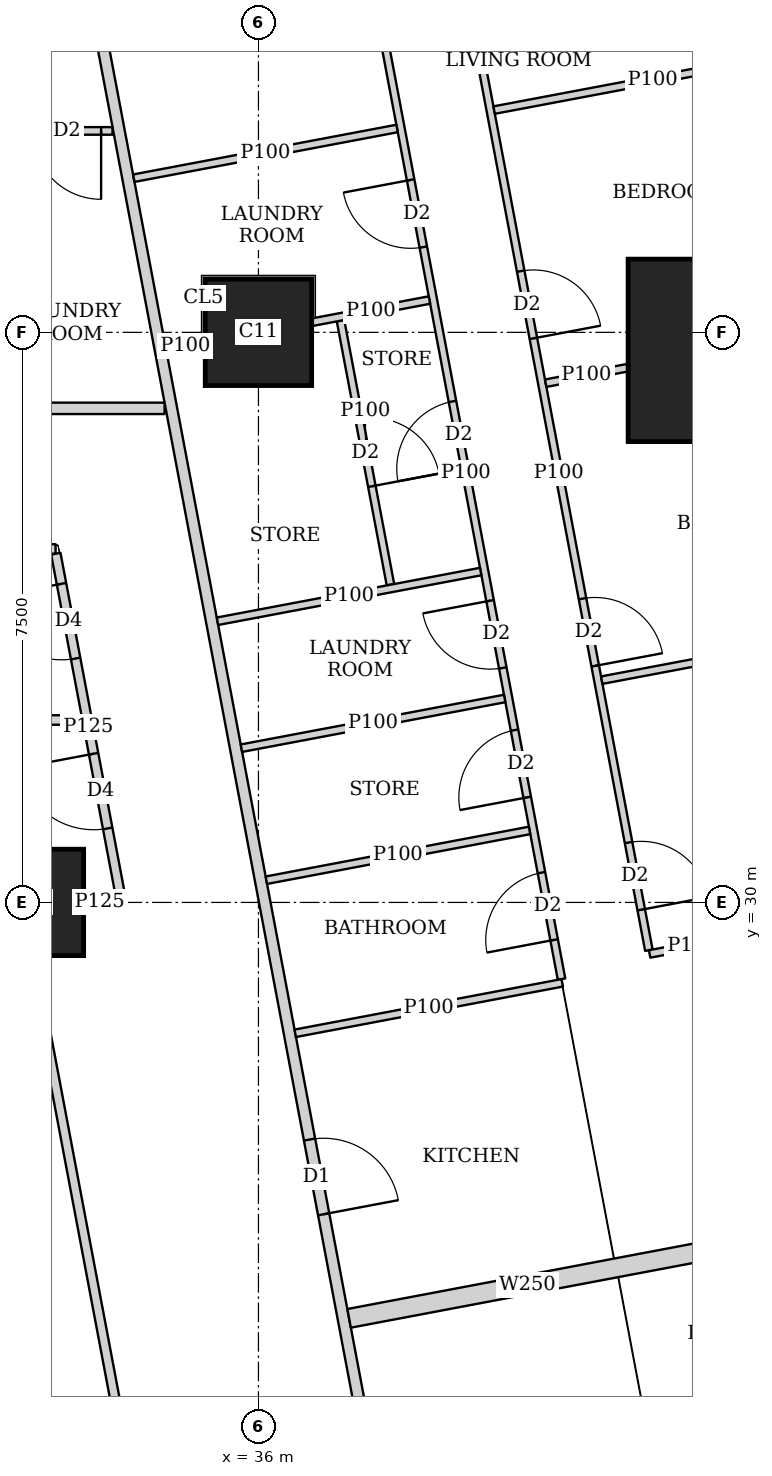
"""IFC4 building model, lengths in metres.
Left out: names, types, materials, properties, quantities, classifications, styles, units other than length and angle.
Written with IfcOpenShell. Run it as: python <this file> out.ifc"""

import sys

from ifc_helpers import new_model, si_unit, direction, frame, frame_2d, origin, origin_2d, place, context, subcontext, project, spatial, rectangle, extrude, element, fill, save


model = new_model("IFC4")
c1 = context("Model", 3, precision=1e-05, world=origin(), true_north=direction((0.0, 1.0)))
c2 = subcontext(c1, "Body", "Model", "MODEL_VIEW")
j1 = project(units=[si_unit("LENGTHUNIT", "METRE"), si_unit("PLANEANGLEUNIT", "RADIAN")], contexts=[c1])
p1 = place(None, origin())
s1 = spatial("IfcSite", under=j1, at=p1, CompositionType="ELEMENT")
p2 = place(p1, origin())
s2 = spatial("IfcBuilding", under=s1, at=p2, CompositionType="ELEMENT")
p3 = place(p2, frame((0.0, 0.0, 227.45)))
s3 = spatial("IfcBuildingStorey", under=s2, at=p3, CompositionType="ELEMENT", Elevation=227.45)
for number, where, z_axis, x_axis in (
    (1, (33.0, 30.0, 0.0), (0.0, 0.0, 1.0), (1.0, 0.0, 0.0)),
    (2, (36.0, 37.5, 0.0), (0.0, 0.0, 1.0), (1.0, 0.0, 0.0)),
):
    element("IfcColumn", number, at=place(p3, frame(where, z_axis=z_axis, x_axis=x_axis)), inside=s3, PredefinedType="COLUMN", context=c2, shape_type="SweptSolid", body=[
        extrude(rectangle(XDim=1.4, YDim=1.4, at=origin_2d()), origin(), (0.0, 0.0, 1.0), 3.75),
    ])
p4 = place(p3, frame((42.064, 37.263, 0.0), z_axis=(0.0, 0.0, 1.0), x_axis=(1.0, 0.0, 0.0)))
e3 = element("IfcColumn", 3, at=p4, inside=s3, PredefinedType="COLUMN", context=c2, shape_type="SweptSolid", body=[
    extrude(rectangle(XDim=2.4, YDim=2.4, at=origin_2d()), origin(), (0.0, 0.0, 1.0), 3.75),
])
p5 = place(p3, frame((16.201, 36.5, 0.0), z_axis=(0.0, 0.0, 1.0), x_axis=(1.0, 0.0, 0.0)))
e4 = element("IfcWall", 4, at=p5, inside=s3, PredefinedType="SOLIDWALL", context=c2, shape_type="SweptSolid", body=[
    extrude(rectangle(XDim=18.564, YDim=0.15, at=frame_2d((9.282, 0.0))), origin(), (0.0, 0.0, 1.0), 3.5),
])
p6 = place(p5, frame((0.874, 0.0, 0.0)))
e5 = element("IfcOpeningElement", 5, at=p6, cuts=e4, PredefinedType="OPENING", context=c2, shape_type="SweptSolid", body=[
    extrude(rectangle(XDim=1.0, YDim=2.1, at=frame_2d((0.5, 1.05))), frame((0.0, 0.085, 0.0), z_axis=(0.0, -1.0, 0.0), x_axis=(1.0, 0.0, 0.0)), (0.0, 0.0, 1.0), 0.17),
])
p7 = place(p5, frame((10.156, 0.0, 0.0)))
e6 = element("IfcOpeningElement", 6, at=p7, cuts=e4, PredefinedType="OPENING", context=c2, shape_type="SweptSolid", body=[
    extrude(rectangle(XDim=1.0, YDim=2.1, at=frame_2d((0.5, 1.05))), frame((0.0, 0.085, 0.0), z_axis=(0.0, -1.0, 0.0), x_axis=(1.0, 0.0, 0.0)), (0.0, 0.0, 1.0), 0.17),
])
p8 = place(p3, frame((33.68, 42.723, 0.0), z_axis=(0.0, 0.0, 1.0), x_axis=(0.185601160014, -0.982625162207, 0.0)))
e7 = element("IfcWall", 7, at=p8, inside=s3, PredefinedType="SOLIDWALL", context=c2, shape_type="SweptSolid", body=[
    extrude(rectangle(XDim=41.051, YDim=0.15, at=frame_2d((20.526, 0.0))), origin(), (0.0, 0.0, 1.0), 2.5),
])
p9 = place(p8, frame((16.123, 0.0, 0.0)))
e8 = element("IfcOpeningElement", 8, at=p9, cuts=e7, PredefinedType="OPENING", context=c2, shape_type="SweptSolid", body=[
    extrude(rectangle(XDim=1.0, YDim=2.1, at=frame_2d((0.5, 1.05))), frame((0.0, 0.085, 0.0), z_axis=(0.0, -1.0, 0.0), x_axis=(1.0, 0.0, 0.0)), (0.0, 0.0, 1.0), 0.17),
])
p10 = place(p8, frame((19.938, 0.0, 0.0)))
e9 = element("IfcOpeningElement", 9, at=p10, cuts=e7, PredefinedType="OPENING", context=c2, shape_type="SweptSolid", body=[
    extrude(rectangle(XDim=1.0, YDim=2.1, at=frame_2d((0.5, 1.05))), frame((0.0, 0.085, 0.0), z_axis=(0.0, -1.0, 0.0), x_axis=(1.0, 0.0, 0.0)), (0.0, 0.0, 1.0), 0.17),
])
p11 = place(p8, frame((30.902, 0.0, 0.0)))
e10 = element("IfcOpeningElement", 10, at=p11, cuts=e7, PredefinedType="OPENING", context=c2, shape_type="SweptSolid", body=[
    extrude(rectangle(XDim=1.0, YDim=2.1, at=frame_2d((0.5, 1.05))), frame((0.0, 0.085, 0.0), z_axis=(0.0, -1.0, 0.0), x_axis=(1.0, 0.0, 0.0)), (0.0, 0.0, 1.0), 0.17),
])
p12 = place(p3, frame((38.764, 41.941, 0.0), z_axis=(0.0, 0.0, 1.0), x_axis=(0.185512176227, -0.982641965556, 0.0)))
e11 = element("IfcWall", 11, at=p12, inside=s3, PredefinedType="PARTITIONING", context=c2, shape_type="SweptSolid", body=[
    extrude(rectangle(XDim=12.792, YDim=0.1, at=frame_2d((6.396, 0.0))), origin(), (0.0, 0.0, 1.0), 2.5),
])
p13 = place(p12, frame((11.35, 0.0, 0.0)))
e12 = element("IfcOpeningElement", 12, at=p13, cuts=e11, PredefinedType="OPENING", context=c2, shape_type="SweptSolid", body=[
    extrude(rectangle(XDim=0.9, YDim=2.1, at=frame_2d((0.45, 1.05))), frame((0.0, 0.06, 0.0), z_axis=(0.0, -1.0, 0.0), x_axis=(1.0, 0.0, 0.0)), (0.0, 0.0, 1.0), 0.12),
])
p14 = place(p12, frame((8.085, 0.0, 0.0)))
e13 = element("IfcOpeningElement", 13, at=p14, cuts=e11, PredefinedType="OPENING", context=c2, shape_type="SweptSolid", body=[
    extrude(rectangle(XDim=0.9, YDim=2.1, at=frame_2d((0.45, 1.05))), frame((0.0, 0.06, 0.0), z_axis=(0.0, -1.0, 0.0), x_axis=(1.0, 0.0, 0.0)), (0.0, 0.0, 1.0), 0.12),
])
p15 = place(p12, frame((3.7, 0.0, 0.0)))
e14 = element("IfcOpeningElement", 14, at=p15, cuts=e11, PredefinedType="OPENING", context=c2, shape_type="SweptSolid", body=[
    extrude(rectangle(XDim=0.9, YDim=2.1, at=frame_2d((0.45, 1.05))), frame((0.0, 0.06, 0.0), z_axis=(0.0, -1.0, 0.0), x_axis=(1.0, 0.0, 0.0)), (0.0, 0.0, 1.0), 0.12),
])
p16 = place(p3, frame((37.473, 42.309, 0.0), z_axis=(0.0, 0.0, 1.0), x_axis=(0.185570636839, -0.982630927024, 0.0)))
e15 = element("IfcWall", 15, at=p16, inside=s3, PredefinedType="PARTITIONING", context=c2, shape_type="SweptSolid", body=[
    extrude(rectangle(XDim=13.553, YDim=0.1, at=frame_2d((6.777, 0.0))), origin(), (0.0, 0.0, 1.0), 2.5),
])
p17 = place(p16, frame((12.128, 0.0, 0.0)))
e16 = element("IfcOpeningElement", 16, at=p17, cuts=e15, PredefinedType="OPENING", context=c2, shape_type="SweptSolid", body=[
    extrude(rectangle(XDim=0.9, YDim=2.1, at=frame_2d((0.45, 1.05))), frame((0.0, 0.06, 0.0), z_axis=(0.0, -1.0, 0.0), x_axis=(1.0, 0.0, 0.0)), (0.0, 0.0, 1.0), 0.12),
])
p18 = place(p16, frame((8.487, 0.0, 0.0)))
e17 = element("IfcOpeningElement", 17, at=p18, cuts=e15, PredefinedType="OPENING", context=c2, shape_type="SweptSolid", body=[
    extrude(rectangle(XDim=0.9, YDim=2.1, at=frame_2d((0.45, 1.05))), frame((0.0, 0.06, 0.0), z_axis=(0.0, -1.0, 0.0), x_axis=(1.0, 0.0, 0.0)), (0.0, 0.0, 1.0), 0.12),
])
p19 = place(p16, frame((2.853, 0.0, 0.0)))
e18 = element("IfcOpeningElement", 18, at=p19, cuts=e15, PredefinedType="OPENING", context=c2, shape_type="SweptSolid", body=[
    extrude(rectangle(XDim=0.9, YDim=2.1, at=frame_2d((0.45, 1.05))), frame((0.0, 0.06, 0.0), z_axis=(0.0, -1.0, 0.0), x_axis=(1.0, 0.0, 0.0)), (0.0, 0.0, 1.0), 0.12),
])
p20 = place(p16, frame((10.22, 0.0, 0.0)))
e19 = element("IfcOpeningElement", 19, at=p20, cuts=e15, PredefinedType="OPENING", context=c2, shape_type="SweptSolid", body=[
    extrude(rectangle(XDim=0.9, YDim=2.1, at=frame_2d((0.45, 1.05))), frame((0.0, 0.06, 0.0), z_axis=(0.0, -1.0, 0.0), x_axis=(1.0, 0.0, 0.0)), (0.0, 0.0, 1.0), 0.12),
])
p21 = place(p16, frame((5.819, 0.0, 0.0)))
e20 = element("IfcOpeningElement", 20, at=p21, cuts=e15, PredefinedType="OPENING", context=c2, shape_type="SweptSolid", body=[
    extrude(rectangle(XDim=0.9, YDim=2.1, at=frame_2d((0.45, 1.05))), frame((0.0, 0.06, 0.0), z_axis=(0.0, -1.0, 0.0), x_axis=(1.0, 0.0, 0.0)), (0.0, 0.0, 1.0), 0.12),
])
p22 = place(p3, frame((43.277, 41.212, 0.0), z_axis=(0.0, 0.0, 1.0), x_axis=(-0.982665405803, -0.185387972203, 0.0)))
e21 = element("IfcWall", 21, at=p22, inside=s3, PredefinedType="PARTITIONING", context=c2, shape_type="SweptSolid", body=[
    extrude(rectangle(XDim=4.25, YDim=0.1, at=frame_2d((2.125, 0.0))), origin(), (0.0, 0.0, 1.0), 2.05),
])
p23 = place(p3, frame((40.854, 37.034, 0.0), z_axis=(0.0, 0.0, 1.0), x_axis=(-0.982651678759, -0.185460718839, 0.0)))
e22 = element("IfcWall", 22, at=p23, inside=s3, PredefinedType="PARTITIONING", context=c2, shape_type="SweptSolid", body=[
    extrude(rectangle(XDim=1.094, YDim=0.1, at=frame_2d((0.547, 0.0))), origin(), (0.0, 0.0, 1.0), 3.5),
])
p24 = place(p3, frame((44.693, 33.713, 0.0), z_axis=(0.0, 0.0, 1.0), x_axis=(-0.982623519589, -0.185609856287, 0.0)))
e23 = element("IfcWall", 23, at=p24, inside=s3, PredefinedType="PARTITIONING", context=c2, shape_type="SweptSolid", body=[
    extrude(rectangle(XDim=4.25, YDim=0.1, at=frame_2d((2.125, 0.0))), origin(), (0.0, 0.0, 1.0), 2.05),
])
p25 = place(p3, frame((42.27, 29.535, 0.0), z_axis=(0.0, 0.0, 1.0), x_axis=(-0.982502700549, -0.186248338017, 0.0)))
e24 = element("IfcWall", 24, at=p25, inside=s3, PredefinedType="PARTITIONING", context=c2, shape_type="SweptSolid", body=[
    extrude(rectangle(XDim=1.143, YDim=0.1, at=frame_2d((0.572, 0.0))), origin(), (0.0, 0.0, 1.0), 2.5),
])
p26 = place(p3, frame((37.824, 40.182, 0.0), z_axis=(0.0, 0.0, 1.0), x_axis=(-0.982648794755, -0.185475998897, 0.0)))
e25 = element("IfcWall", 25, at=p26, inside=s3, PredefinedType="PARTITIONING", context=c2, shape_type="SweptSolid", body=[
    extrude(rectangle(XDim=3.525, YDim=0.1, at=frame_2d((1.763, 0.0))), origin(), (0.0, 0.0, 1.0), 3.5),
])
p27 = place(p3, frame((38.25, 37.925, 0.0), z_axis=(0.0, 0.0, 1.0), x_axis=(-0.982610209589, -0.185680305934, 0.0)))
e26 = element("IfcWall", 26, at=p27, inside=s3, PredefinedType="PARTITIONING", context=c2, shape_type="SweptSolid", body=[
    extrude(rectangle(XDim=1.567, YDim=0.1, at=frame_2d((0.784, 0.0))), origin(), (0.0, 0.0, 1.0), 3.5),
])
p28 = place(p3, frame((35.29, 37.366, 0.0), z_axis=(0.0, 0.0, 1.0), x_axis=(-0.982715597703, -0.185121727606, 0.0)))
e27 = element("IfcWall", 27, at=p28, inside=s3, PredefinedType="PARTITIONING", context=c2, shape_type="SweptSolid", body=[
    extrude(rectangle(XDim=0.513, YDim=0.1, at=frame_2d((0.256, 0.0))), origin(), (0.0, 0.0, 1.0), 3.5),
])
p29 = place(p3, frame((39.24, 32.683, 0.0), z_axis=(0.0, 0.0, 1.0), x_axis=(-0.982638553676, -0.185530247748, 0.0)))
e28 = element("IfcWall", 28, at=p29, inside=s3, PredefinedType="PARTITIONING", context=c2, shape_type="SweptSolid", body=[
    extrude(rectangle(XDim=3.525, YDim=0.1, at=frame_2d((1.763, 0.0))), origin(), (0.0, 0.0, 1.0), 3.5),
])
p30 = place(p3, frame((39.997, 28.942, 0.0), z_axis=(0.0, 0.0, 1.0), x_axis=(-0.982613029841, -0.185665380691, 0.0)))
e29 = element("IfcWall", 29, at=p30, inside=s3, PredefinedType="PARTITIONING", context=c2, shape_type="SweptSolid", body=[
    extrude(rectangle(XDim=3.575, YDim=0.1, at=frame_2d((1.788, 0.0))), origin(), (0.0, 0.0, 1.0), 3.5),
])
p31 = place(p3, frame((39.567, 30.947, 0.0), z_axis=(0.0, 0.0, 1.0), x_axis=(-0.982576058723, -0.185860939478, 0.0)))
e30 = element("IfcWall", 30, at=p31, inside=s3, PredefinedType="PARTITIONING", context=c2, shape_type="SweptSolid", body=[
    extrude(rectangle(XDim=3.524, YDim=0.1, at=frame_2d((1.762, 0.0))), origin(), (0.0, 0.0, 1.0), 2.5),
])
p32 = place(p3, frame((38.924, 34.353, 0.0), z_axis=(0.0, 0.0, 1.0), x_axis=(-0.982629014545, -0.18558076348, 0.0)))
e31 = element("IfcWall", 31, at=p32, inside=s3, PredefinedType="PARTITIONING", context=c2, shape_type="SweptSolid", body=[
    extrude(rectangle(XDim=3.524, YDim=0.1, at=frame_2d((1.762, 0.0))), origin(), (0.0, 0.0, 1.0), 3.5),
])
p33 = place(p3, frame((41.885, 25.415, 0.0), z_axis=(0.0, 0.0, 1.0), x_axis=(-0.982596737686, -0.185751584349, 0.0)))
e32 = element("IfcWall", 32, at=p33, inside=s3, PredefinedType="SOLIDWALL", context=c2, shape_type="SweptSolid", body=[
    extrude(rectangle(XDim=4.775, YDim=0.25, at=frame_2d((2.387, 0.0))), origin(), (0.0, 0.0, 1.0), 3.5),
])
p34 = place(p3, frame((28.8, 40.15, 0.0), z_axis=(0.0, 0.0, 1.0), x_axis=(1.0, 0.0, 0.0)))
e33 = element("IfcWall", 33, at=p34, inside=s3, PredefinedType="PARTITIONING", context=c2, shape_type="SweptSolid", body=[
    extrude(rectangle(XDim=5.28, YDim=0.1, at=frame_2d((2.64, 0.0))), origin(), (0.0, 0.0, 1.0), 3.5),
])
p35 = place(p34, frame((0.575, 0.0, 0.0)))
e34 = element("IfcOpeningElement", 34, at=p35, cuts=e33, PredefinedType="OPENING", context=c2, shape_type="SweptSolid", body=[
    extrude(rectangle(XDim=0.9, YDim=2.1, at=frame_2d((0.45, 1.05))), frame((0.0, 0.06, 0.0), z_axis=(0.0, -1.0, 0.0), x_axis=(1.0, 0.0, 0.0)), (0.0, 0.0, 1.0), 0.12),
])
p36 = place(p34, frame((4.23, 0.0, 0.0)))
e35 = element("IfcOpeningElement", 35, at=p36, cuts=e33, PredefinedType="OPENING", context=c2, shape_type="SweptSolid", body=[
    extrude(rectangle(XDim=0.9, YDim=2.1, at=frame_2d((0.45, 1.05))), frame((0.0, 0.06, 0.0), z_axis=(0.0, -1.0, 0.0), x_axis=(1.0, 0.0, 0.0)), (0.0, 0.0, 1.0), 0.12),
])
p37 = place(p34, frame((2.375, 0.0, 0.0)))
e36 = element("IfcOpeningElement", 36, at=p37, cuts=e33, PredefinedType="OPENING", context=c2, shape_type="SweptSolid", body=[
    extrude(rectangle(XDim=0.9, YDim=2.1, at=frame_2d((0.45, 1.05))), frame((0.0, 0.06, 0.0), z_axis=(0.0, -1.0, 0.0), x_axis=(1.0, 0.0, 0.0)), (0.0, 0.0, 1.0), 0.12),
])
p38 = place(p3, frame((37.08, 37.653, 0.0), z_axis=(0.0, 0.0, 1.0), x_axis=(0.185864634688, -0.982575359742, 0.0)))
e37 = element("IfcWall", 37, at=p38, inside=s3, PredefinedType="PARTITIONING", context=c2, shape_type="SweptSolid", body=[
    extrude(rectangle(XDim=3.535, YDim=0.1, at=frame_2d((1.767, 0.0))), origin(), (0.0, 0.0, 1.0), 3.5),
])
p39 = place(p38, frame((1.317, 0.0, 0.0)))
e38 = element("IfcOpeningElement", 38, at=p39, cuts=e37, PredefinedType="OPENING", context=c2, shape_type="SweptSolid", body=[
    extrude(rectangle(XDim=0.9, YDim=2.1, at=frame_2d((0.45, 1.05))), frame((0.0, 0.06, 0.0), z_axis=(0.0, -1.0, 0.0), x_axis=(1.0, 0.0, 0.0)), (0.0, 0.0, 1.0), 0.12),
])
p40 = place(p3, frame((28.95, 34.65, 0.0), z_axis=(0.0, 0.0, 1.0), x_axis=(1.0, 0.0, 0.0)))
e39 = element("IfcWall", 39, at=p40, inside=s3, PredefinedType="PARTITIONING", context=c2, shape_type="SweptSolid", body=[
    extrude(rectangle(XDim=4.381, YDim=0.125, at=frame_2d((2.19, 0.0))), origin(), (0.0, 0.0, 1.0), 3.5),
])
p41 = place(p3, frame((34.193, 30.04, 0.0), z_axis=(0.0, 0.0, 1.0), x_axis=(-0.185626015863, 0.982620467034, 0.0)))
e40 = element("IfcWall", 40, at=p41, inside=s3, PredefinedType="PARTITIONING", context=c2, shape_type="SweptSolid", body=[
    extrude(rectangle(XDim=4.628, YDim=0.125, at=frame_2d((2.314, 0.0))), origin(), (0.0, 0.0, 1.0), 2.5),
])
p42 = place(p41, frame((0.95, 0.0, 0.0)))
e41 = element("IfcOpeningElement", 41, at=p42, cuts=e40, PredefinedType="OPENING", context=c2, shape_type="SweptSolid", body=[
    extrude(rectangle(XDim=1.0, YDim=2.1, at=frame_2d((0.5, 1.05))), frame((0.0, 0.073, 0.0), z_axis=(0.0, -1.0, 0.0), x_axis=(1.0, 0.0, 0.0)), (0.0, 0.0, 1.0), 0.145),
])
p43 = place(p41, frame((3.225, 0.0, 0.0)))
e42 = element("IfcOpeningElement", 42, at=p43, cuts=e40, PredefinedType="OPENING", context=c2, shape_type="SweptSolid", body=[
    extrude(rectangle(XDim=1.0, YDim=2.1, at=frame_2d((0.5, 1.05))), frame((0.0, 0.073, 0.0), z_axis=(0.0, -1.0, 0.0), x_axis=(1.0, 0.0, 0.0)), (0.0, 0.0, 1.0), 0.145),
])
p44 = place(p3, frame((35.576, 15.713, 0.0), z_axis=(0.0, 0.0, 1.0), x_axis=(-0.185602982696, 0.982624817931, 0.0)))
e43 = element("IfcWall", 43, at=p44, inside=s3, PredefinedType="PARTITIONING", context=c2, shape_type="SweptSolid", body=[
    extrude(rectangle(XDim=13.814, YDim=0.125, at=frame_2d((6.907, 0.0))), origin(), (0.0, 0.0, 1.0), 2.5),
])
p45 = place(p44, frame((5.3, 0.0, 0.0)))
e44 = element("IfcOpeningElement", 44, at=p45, cuts=e43, PredefinedType="OPENING", context=c2, shape_type="SweptSolid", body=[
    extrude(rectangle(XDim=1.0, YDim=2.1, at=frame_2d((0.5, 1.05))), frame((0.0, 0.073, 0.0), z_axis=(0.0, -1.0, 0.0), x_axis=(1.0, 0.0, 0.0)), (0.0, 0.0, 1.0), 0.145),
])
p46 = place(p3, frame((33.701, 30.0, 0.0), z_axis=(0.0, 0.0, 1.0), x_axis=(1.0, 0.0, 0.0)))
e45 = element("IfcWall", 45, at=p46, inside=s3, PredefinedType="PARTITIONING", context=c2, shape_type="SweptSolid", body=[
    extrude(rectangle(XDim=0.424, YDim=0.125, at=frame_2d((0.212, 0.0))), origin(), (0.0, 0.0, 1.0), 2.5),
])
p47 = place(p3, frame((28.95, 32.4, 0.0), z_axis=(0.0, 0.0, 1.0), x_axis=(1.0, 0.0, 0.0)))
e46 = element("IfcWall", 46, at=p47, inside=s3, PredefinedType="PARTITIONING", context=c2, shape_type="SweptSolid", body=[
    extrude(rectangle(XDim=4.722, YDim=0.125, at=frame_2d((2.361, 0.0))), origin(), (0.0, 0.0, 1.0), 3.5),
])
p48 = place(p13, origin())
e47 = element("IfcDoor", 47, at=p48, inside=s3, OperationType="SINGLE_SWING_RIGHT", PredefinedType="DOOR", context=c2, shape_type="SweptSolid", body=[
    extrude(rectangle(XDim=0.9, YDim=2.1, at=frame_2d((0.45, 1.05))), frame((0.0, 0.025, 0.0), z_axis=(0.0, -1.0, 0.0), x_axis=(1.0, 0.0, 0.0)), (0.0, 0.0, 1.0), 0.05),
])
fill(e12, e47)
p49 = place(p14, origin())
e48 = element("IfcDoor", 48, at=p49, inside=s3, OperationType="SINGLE_SWING_RIGHT", PredefinedType="DOOR", context=c2, shape_type="SweptSolid", body=[
    extrude(rectangle(XDim=0.9, YDim=2.1, at=frame_2d((0.45, 1.05))), frame((0.0, 0.025, 0.0), z_axis=(0.0, -1.0, 0.0), x_axis=(1.0, 0.0, 0.0)), (0.0, 0.0, 1.0), 0.05),
])
fill(e13, e48)
p50 = place(p15, origin())
e49 = element("IfcDoor", 49, at=p50, inside=s3, OperationType="SINGLE_SWING_RIGHT", PredefinedType="DOOR", context=c2, shape_type="SweptSolid", body=[
    extrude(rectangle(XDim=0.9, YDim=2.1, at=frame_2d((0.45, 1.05))), frame((0.0, 0.025, 0.0), z_axis=(0.0, -1.0, 0.0), x_axis=(1.0, 0.0, 0.0)), (0.0, 0.0, 1.0), 0.05),
])
fill(e14, e49)
p51 = place(p17, origin())
e50 = element("IfcDoor", 50, at=p51, inside=s3, OperationType="SINGLE_SWING_LEFT", PredefinedType="DOOR", context=c2, shape_type="SweptSolid", body=[
    extrude(rectangle(XDim=0.9, YDim=2.1, at=frame_2d((0.45, 1.05))), frame((0.0, 0.025, 0.0), z_axis=(0.0, -1.0, 0.0), x_axis=(1.0, 0.0, 0.0)), (0.0, 0.0, 1.0), 0.05),
])
fill(e16, e50)
p52 = place(p18, origin())
e51 = element("IfcDoor", 51, at=p52, inside=s3, OperationType="SINGLE_SWING_RIGHT", PredefinedType="DOOR", context=c2, shape_type="SweptSolid", body=[
    extrude(rectangle(XDim=0.9, YDim=2.1, at=frame_2d((0.45, 1.05))), frame((0.0, 0.025, 0.0), z_axis=(0.0, -1.0, 0.0), x_axis=(1.0, 0.0, 0.0)), (0.0, 0.0, 1.0), 0.05),
])
fill(e17, e51)
p53 = place(p19, origin())
e52 = element("IfcDoor", 52, at=p53, inside=s3, OperationType="SINGLE_SWING_RIGHT", PredefinedType="DOOR", context=c2, shape_type="SweptSolid", body=[
    extrude(rectangle(XDim=0.9, YDim=2.1, at=frame_2d((0.45, 1.05))), frame((0.0, 0.025, 0.0), z_axis=(0.0, -1.0, 0.0), x_axis=(1.0, 0.0, 0.0)), (0.0, 0.0, 1.0), 0.05),
])
fill(e18, e52)
p54 = place(p20, origin())
e53 = element("IfcDoor", 53, at=p54, inside=s3, OperationType="SINGLE_SWING_LEFT", PredefinedType="DOOR", context=c2, shape_type="SweptSolid", body=[
    extrude(rectangle(XDim=0.9, YDim=2.1, at=frame_2d((0.45, 1.05))), frame((0.0, 0.025, 0.0), z_axis=(0.0, -1.0, 0.0), x_axis=(1.0, 0.0, 0.0)), (0.0, 0.0, 1.0), 0.05),
])
fill(e19, e53)
p55 = place(p21, origin())
e54 = element("IfcDoor", 54, at=p55, inside=s3, OperationType="SINGLE_SWING_LEFT", PredefinedType="DOOR", context=c2, shape_type="SweptSolid", body=[
    extrude(rectangle(XDim=0.9, YDim=2.1, at=frame_2d((0.45, 1.05))), frame((0.0, 0.025, 0.0), z_axis=(0.0, -1.0, 0.0), x_axis=(1.0, 0.0, 0.0)), (0.0, 0.0, 1.0), 0.05),
])
fill(e20, e54)
p56 = place(p9, origin())
e55 = element("IfcDoor", 55, at=p56, inside=s3, OperationType="SINGLE_SWING_RIGHT", PredefinedType="DOOR", context=c2, shape_type="SweptSolid", body=[
    extrude(rectangle(XDim=1.0, YDim=2.1, at=frame_2d((0.5, 1.05))), frame((0.0, 0.025, 0.0), z_axis=(0.0, -1.0, 0.0), x_axis=(1.0, 0.0, 0.0)), (0.0, 0.0, 1.0), 0.05),
])
fill(e8, e55)
p57 = place(p36, origin())
e56 = element("IfcDoor", 56, at=p57, inside=s3, OperationType="SINGLE_SWING_LEFT", PredefinedType="DOOR", context=c2, shape_type="SweptSolid", body=[
    extrude(rectangle(XDim=0.9, YDim=2.1, at=frame_2d((0.45, 1.05))), frame((0.0, 0.025, 0.0), z_axis=(0.0, -1.0, 0.0), x_axis=(1.0, 0.0, 0.0)), (0.0, 0.0, 1.0), 0.05),
])
fill(e35, e56)
p58 = place(p39, origin())
e57 = element("IfcDoor", 57, at=p58, inside=s3, OperationType="SINGLE_SWING_RIGHT", PredefinedType="DOOR", context=c2, shape_type="SweptSolid", body=[
    extrude(rectangle(XDim=0.9, YDim=2.1, at=frame_2d((0.45, 1.05))), frame((0.0, 0.025, 0.0), z_axis=(0.0, -1.0, 0.0), x_axis=(1.0, 0.0, 0.0)), (0.0, 0.0, 1.0), 0.05),
])
fill(e38, e57)
p59 = place(p42, origin())
e58 = element("IfcDoor", 58, at=p59, inside=s3, OperationType="SINGLE_SWING_RIGHT", PredefinedType="DOOR", context=c2, shape_type="SweptSolid", body=[
    extrude(rectangle(XDim=1.0, YDim=2.1, at=frame_2d((0.5, 1.05))), frame((0.0, 0.025, 0.0), z_axis=(0.0, -1.0, 0.0), x_axis=(1.0, 0.0, 0.0)), (0.0, 0.0, 1.0), 0.05),
])
fill(e41, e58)
p60 = place(p43, origin())
e59 = element("IfcDoor", 59, at=p60, inside=s3, OperationType="SINGLE_SWING_RIGHT", PredefinedType="DOOR", context=c2, shape_type="SweptSolid", body=[
    extrude(rectangle(XDim=1.0, YDim=2.1, at=frame_2d((0.5, 1.05))), frame((0.0, 0.025, 0.0), z_axis=(0.0, -1.0, 0.0), x_axis=(1.0, 0.0, 0.0)), (0.0, 0.0, 1.0), 0.05),
])
fill(e42, e59)
save(model, sys.argv[1])
